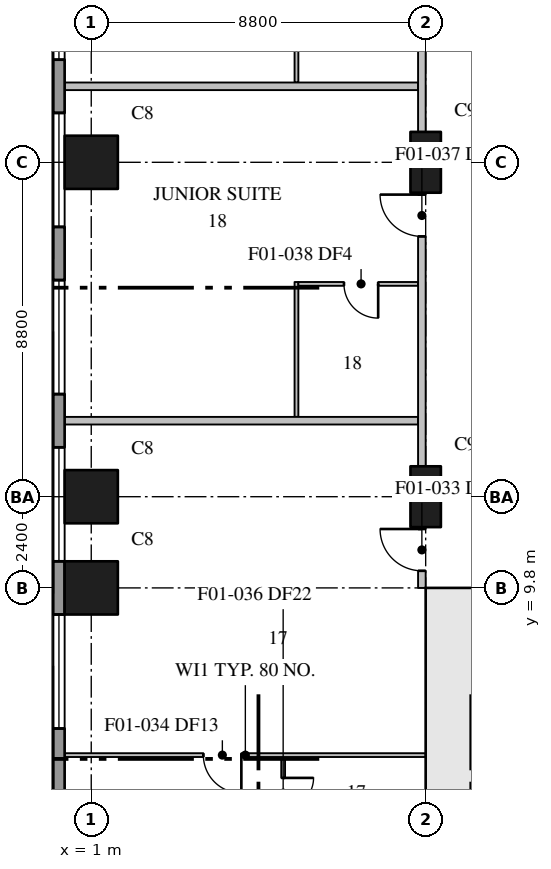
"""IFC4 building model, lengths in metres.
Left out: names, types, materials, properties, quantities, classifications, styles, units other than length and angle.
Written with IfcOpenShell. Run it as: python <this file> out.ifc"""

import sys

from ifc_helpers import new_model, si_unit, direction, frame, frame_2d, origin, origin_2d, place, context, subcontext, project, spatial, rectangle, extrude, element, fill, save


model = new_model("IFC4")
c1 = context("Model", 3, precision=1e-05, world=origin(), true_north=direction((0.0, 1.0)))
c2 = subcontext(c1, "Body", "Model", "MODEL_VIEW")
j1 = project(units=[si_unit("LENGTHUNIT", "METRE"), si_unit("PLANEANGLEUNIT", "RADIAN")], contexts=[c1])
p1 = place(None, origin())
s1 = spatial("IfcSite", under=j1, at=p1, CompositionType="ELEMENT")
p2 = place(p1, origin())
s2 = spatial("IfcBuilding", under=s1, at=p2, CompositionType="ELEMENT")
p3 = place(p2, frame((0.0, 0.0, 37.7)))
s3 = spatial("IfcBuildingStorey", under=s2, at=p3, CompositionType="ELEMENT", Elevation=37.7)
for number, where, z_axis, x_axis in (
    (1, (1.0, 9.8, 0.0), (0.0, 0.0, 1.0), (1.0, 0.0, 0.0)),
    (2, (1.0, 12.2, 0.0), (0.0, 0.0, 1.0), (1.0, 0.0, 0.0)),
    (3, (1.0, 21.0, 0.0), (0.0, 0.0, 1.0), (1.0, 0.0, 0.0)),
):
    element("IfcColumn", number, at=place(p3, frame(where, z_axis=z_axis, x_axis=x_axis)), inside=s3, PredefinedType="COLUMN", context=c2, shape_type="SweptSolid", body=[
        extrude(rectangle(XDim=1.4, YDim=1.4, at=origin_2d()), origin(), (0.0, 0.0, 1.0), 3.7),
    ])
for number, where, z_axis, x_axis in (
    (4, (9.8, 12.2, 0.0), (0.0, 0.0, 1.0), (0.0, 1.0, 0.0)),
    (5, (9.8, 21.0, 0.0), (0.0, 0.0, 1.0), (0.0, 1.0, 0.0)),
):
    element("IfcColumn", number, at=place(p3, frame(where, z_axis=z_axis, x_axis=x_axis)), inside=s3, PredefinedType="COLUMN", context=c2, shape_type="SweptSolid", body=[
        extrude(rectangle(XDim=1.6, YDim=0.8, at=origin_2d()), origin(), (0.0, 0.0, 1.0), 3.7),
    ])
p4 = place(p3, frame((10.5, 1.2, 0.0), z_axis=(0.0, 0.0, 1.0), x_axis=(0.0, 1.0, 0.0)))
e6 = element("IfcWall", 6, at=p4, inside=s3, PredefinedType="SHEAR", context=c2, shape_type="SweptSolid", body=[
    extrude(rectangle(XDim=8.6, YDim=1.0, at=frame_2d((4.3, 0.0))), origin(), (0.0, 0.0, 1.0), 3.7),
])
p5 = place(p3, frame((9.8, 9.6, 0.0), z_axis=(0.0, 0.0, 1.0), x_axis=(1.0, 0.0, 0.0)))
e7 = element("IfcWall", 7, at=p5, inside=s3, PredefinedType="SHEAR", context=c2, shape_type="SweptSolid", body=[
    extrude(rectangle(XDim=4.3, YDim=0.4, at=frame_2d((2.15, 0.0))), origin(), (0.0, 0.0, 1.0), 3.7),
])
p6 = place(p5, frame((2.05, 0.0, 0.0)))
e8 = element("IfcOpeningElement", 8, at=p6, cuts=e7, PredefinedType="OPENING", context=c2, shape_type="SweptSolid", body=[
    extrude(rectangle(XDim=1.2, YDim=2.1, at=frame_2d((0.6, 1.05))), frame((0.0, 0.21, 0.0), z_axis=(0.0, -1.0, 0.0), x_axis=(1.0, 0.0, 0.0)), (0.0, 0.0, 1.0), 0.42),
])
p7 = place(p3, frame((0.15, 78.7, 0.0), z_axis=(0.0, 0.0, 1.0), x_axis=(0.0, -1.0, 0.0)))
e9 = element("IfcWall", 9, at=p7, inside=s3, PredefinedType="STANDARD", context=c2, shape_type="SweptSolid", body=[
    extrude(rectangle(XDim=76.5, YDim=0.3, at=frame_2d((38.25, 0.0))), origin(), (0.0, 0.0, 1.0), 3.4),
])
p8 = place(p7, frame((3.6, 0.0, 0.75)))
e10 = element("IfcOpeningElement", 10, at=p8, cuts=e9, PredefinedType="OPENING", context=c2, shape_type="SweptSolid", body=[
    extrude(rectangle(XDim=3.0, YDim=2.3, at=frame_2d((1.5, 1.15))), frame((0.0, 0.16, 0.0), z_axis=(0.0, -1.0, 0.0), x_axis=(1.0, 0.0, 0.0)), (0.0, 0.0, 1.0), 0.32),
])
p9 = place(p7, frame((8.0, 0.0, 0.75)))
e11 = element("IfcOpeningElement", 11, at=p9, cuts=e9, PredefinedType="OPENING", context=c2, shape_type="SweptSolid", body=[
    extrude(rectangle(XDim=3.0, YDim=2.3, at=frame_2d((1.5, 1.15))), frame((0.0, 0.16, 0.0), z_axis=(0.0, -1.0, 0.0), x_axis=(1.0, 0.0, 0.0)), (0.0, 0.0, 1.0), 0.32),
])
p10 = place(p7, frame((12.4, 0.0, 0.75)))
e12 = element("IfcOpeningElement", 12, at=p10, cuts=e9, PredefinedType="OPENING", context=c2, shape_type="SweptSolid", body=[
    extrude(rectangle(XDim=3.0, YDim=2.3, at=frame_2d((1.5, 1.15))), frame((0.0, 0.16, 0.0), z_axis=(0.0, -1.0, 0.0), x_axis=(1.0, 0.0, 0.0)), (0.0, 0.0, 1.0), 0.32),
])
p11 = place(p7, frame((16.8, 0.0, 0.75)))
e13 = element("IfcOpeningElement", 13, at=p11, cuts=e9, PredefinedType="OPENING", context=c2, shape_type="SweptSolid", body=[
    extrude(rectangle(XDim=3.0, YDim=2.3, at=frame_2d((1.5, 1.15))), frame((0.0, 0.16, 0.0), z_axis=(0.0, -1.0, 0.0), x_axis=(1.0, 0.0, 0.0)), (0.0, 0.0, 1.0), 0.32),
])
p12 = place(p7, frame((21.2, 0.0, 0.75)))
e14 = element("IfcOpeningElement", 14, at=p12, cuts=e9, PredefinedType="OPENING", context=c2, shape_type="SweptSolid", body=[
    extrude(rectangle(XDim=3.0, YDim=2.3, at=frame_2d((1.5, 1.15))), frame((0.0, 0.16, 0.0), z_axis=(0.0, -1.0, 0.0), x_axis=(1.0, 0.0, 0.0)), (0.0, 0.0, 1.0), 0.32),
])
p13 = place(p7, frame((25.6, 0.0, 0.75)))
e15 = element("IfcOpeningElement", 15, at=p13, cuts=e9, PredefinedType="OPENING", context=c2, shape_type="SweptSolid", body=[
    extrude(rectangle(XDim=3.0, YDim=2.3, at=frame_2d((1.5, 1.15))), frame((0.0, 0.16, 0.0), z_axis=(0.0, -1.0, 0.0), x_axis=(1.0, 0.0, 0.0)), (0.0, 0.0, 1.0), 0.32),
])
p14 = place(p7, frame((30.0, 0.0, 0.75)))
e16 = element("IfcOpeningElement", 16, at=p14, cuts=e9, PredefinedType="OPENING", context=c2, shape_type="SweptSolid", body=[
    extrude(rectangle(XDim=3.0, YDim=2.3, at=frame_2d((1.5, 1.15))), frame((0.0, 0.16, 0.0), z_axis=(0.0, -1.0, 0.0), x_axis=(1.0, 0.0, 0.0)), (0.0, 0.0, 1.0), 0.32),
])
p15 = place(p7, frame((34.4, 0.0, 0.75)))
e17 = element("IfcOpeningElement", 17, at=p15, cuts=e9, PredefinedType="OPENING", context=c2, shape_type="SweptSolid", body=[
    extrude(rectangle(XDim=3.0, YDim=2.3, at=frame_2d((1.5, 1.15))), frame((0.0, 0.16, 0.0), z_axis=(0.0, -1.0, 0.0), x_axis=(1.0, 0.0, 0.0)), (0.0, 0.0, 1.0), 0.32),
])
p16 = place(p7, frame((38.8, 0.0, 0.75)))
e18 = element("IfcOpeningElement", 18, at=p16, cuts=e9, PredefinedType="OPENING", context=c2, shape_type="SweptSolid", body=[
    extrude(rectangle(XDim=3.0, YDim=2.3, at=frame_2d((1.5, 1.15))), frame((0.0, 0.16, 0.0), z_axis=(0.0, -1.0, 0.0), x_axis=(1.0, 0.0, 0.0)), (0.0, 0.0, 1.0), 0.32),
])
p17 = place(p7, frame((43.2, 0.0, 0.75)))
e19 = element("IfcOpeningElement", 19, at=p17, cuts=e9, PredefinedType="OPENING", context=c2, shape_type="SweptSolid", body=[
    extrude(rectangle(XDim=3.0, YDim=2.3, at=frame_2d((1.5, 1.15))), frame((0.0, 0.16, 0.0), z_axis=(0.0, -1.0, 0.0), x_axis=(1.0, 0.0, 0.0)), (0.0, 0.0, 1.0), 0.32),
])
p18 = place(p7, frame((47.6, 0.0, 0.75)))
e20 = element("IfcOpeningElement", 20, at=p18, cuts=e9, PredefinedType="OPENING", context=c2, shape_type="SweptSolid", body=[
    extrude(rectangle(XDim=3.0, YDim=2.3, at=frame_2d((1.5, 1.15))), frame((0.0, 0.16, 0.0), z_axis=(0.0, -1.0, 0.0), x_axis=(1.0, 0.0, 0.0)), (0.0, 0.0, 1.0), 0.32),
])
p19 = place(p7, frame((52.0, 0.0, 0.75)))
e21 = element("IfcOpeningElement", 21, at=p19, cuts=e9, PredefinedType="OPENING", context=c2, shape_type="SweptSolid", body=[
    extrude(rectangle(XDim=3.0, YDim=2.3, at=frame_2d((1.5, 1.15))), frame((0.0, 0.16, 0.0), z_axis=(0.0, -1.0, 0.0), x_axis=(1.0, 0.0, 0.0)), (0.0, 0.0, 1.0), 0.32),
])
p20 = place(p7, frame((56.4, 0.0, 0.75)))
e22 = element("IfcOpeningElement", 22, at=p20, cuts=e9, PredefinedType="OPENING", context=c2, shape_type="SweptSolid", body=[
    extrude(rectangle(XDim=3.0, YDim=2.3, at=frame_2d((1.5, 1.15))), frame((0.0, 0.16, 0.0), z_axis=(0.0, -1.0, 0.0), x_axis=(1.0, 0.0, 0.0)), (0.0, 0.0, 1.0), 0.32),
])
p21 = place(p7, frame((60.8, 0.0, 0.75)))
e23 = element("IfcOpeningElement", 23, at=p21, cuts=e9, PredefinedType="OPENING", context=c2, shape_type="SweptSolid", body=[
    extrude(rectangle(XDim=3.0, YDim=2.3, at=frame_2d((1.5, 1.15))), frame((0.0, 0.16, 0.0), z_axis=(0.0, -1.0, 0.0), x_axis=(1.0, 0.0, 0.0)), (0.0, 0.0, 1.0), 0.32),
])
p22 = place(p7, frame((65.2, 0.0, 0.75)))
e24 = element("IfcOpeningElement", 24, at=p22, cuts=e9, PredefinedType="OPENING", context=c2, shape_type="SweptSolid", body=[
    extrude(rectangle(XDim=3.0, YDim=2.3, at=frame_2d((1.5, 1.15))), frame((0.0, 0.16, 0.0), z_axis=(0.0, -1.0, 0.0), x_axis=(1.0, 0.0, 0.0)), (0.0, 0.0, 1.0), 0.32),
])
p23 = place(p7, frame((69.6, 0.0, 0.75)))
e25 = element("IfcOpeningElement", 25, at=p23, cuts=e9, PredefinedType="OPENING", context=c2, shape_type="SweptSolid", body=[
    extrude(rectangle(XDim=3.0, YDim=2.3, at=frame_2d((1.5, 1.15))), frame((0.0, 0.16, 0.0), z_axis=(0.0, -1.0, 0.0), x_axis=(1.0, 0.0, 0.0)), (0.0, 0.0, 1.0), 0.32),
])
p24 = place(p3, frame((9.7, 9.8, 0.0), z_axis=(0.0, 0.0, 1.0), x_axis=(0.0, 1.0, 0.0)))
e26 = element("IfcWall", 26, at=p24, inside=s3, PredefinedType="PARTITIONING", context=c2, shape_type="SweptSolid", body=[
    extrude(rectangle(XDim=1.6, YDim=0.2, at=frame_2d((0.8, 0.0))), origin(), (0.0, 0.0, 1.0), 3.4),
])
p25 = place(p24, frame((0.45, 0.0, 0.0)))
e27 = element("IfcOpeningElement", 27, at=p25, cuts=e26, PredefinedType="OPENING", context=c2, shape_type="SweptSolid", body=[
    extrude(rectangle(XDim=1.1, YDim=2.1, at=frame_2d((0.55, 1.05))), frame((0.0, 0.11, 0.0), z_axis=(0.0, -1.0, 0.0), x_axis=(1.0, 0.0, 0.0)), (0.0, 0.0, 1.0), 0.22),
])
p26 = place(p3, frame((9.7, 13.0, 0.0), z_axis=(0.0, 0.0, 1.0), x_axis=(0.0, 1.0, 0.0)))
e28 = element("IfcWall", 28, at=p26, inside=s3, PredefinedType="PARTITIONING", context=c2, shape_type="SweptSolid", body=[
    extrude(rectangle(XDim=7.2, YDim=0.2, at=frame_2d((3.6, 0.0))), origin(), (0.0, 0.0, 1.0), 3.4),
])
p27 = place(p26, frame((6.05, 0.0, 0.0)))
e29 = element("IfcOpeningElement", 29, at=p27, cuts=e28, PredefinedType="OPENING", context=c2, shape_type="SweptSolid", body=[
    extrude(rectangle(XDim=1.1, YDim=2.1, at=frame_2d((0.55, 1.05))), frame((0.0, 0.11, 0.0), z_axis=(0.0, -1.0, 0.0), x_axis=(1.0, 0.0, 0.0)), (0.0, 0.0, 1.0), 0.22),
])
p28 = place(p3, frame((9.7, 21.8, 0.0), z_axis=(0.0, 0.0, 1.0), x_axis=(0.0, 1.0, 0.0)))
e30 = element("IfcWall", 30, at=p28, inside=s3, PredefinedType="PARTITIONING", context=c2, shape_type="SweptSolid", body=[
    extrude(rectangle(XDim=4.8, YDim=0.2, at=frame_2d((2.4, 0.0))), origin(), (0.0, 0.0, 1.0), 3.4),
])
for number, where, z_axis, x_axis in (
    (31, (0.31, 14.2, 0.0), (0.0, 0.0, 1.0), (1.0, 0.0, 0.0)),
    (32, (0.31, 23.0, 0.0), (0.0, 0.0, 1.0), (1.0, 0.0, 0.0)),
):
    element("IfcWall", number, at=place(p3, frame(where, z_axis=z_axis, x_axis=x_axis)), inside=s3, PredefinedType="PARTITIONING", context=c2, shape_type="SweptSolid", body=[
        extrude(rectangle(XDim=9.29, YDim=0.2, at=frame_2d((4.645, 0.0))), origin(), (0.0, 0.0, 1.0), 3.4),
    ])
p29 = place(p3, frame((6.05, 5.35, 0.0), z_axis=(0.0, 0.0, 1.0), x_axis=(0.0, -1.0, 0.0)))
e33 = element("IfcWall", 33, at=p29, inside=s3, PredefinedType="PARTITIONING", context=c2, shape_type="SweptSolid", body=[
    extrude(rectangle(XDim=4.4, YDim=0.1, at=frame_2d((2.2, 0.0))), origin(), (0.0, 0.0, 1.0), 3.4),
])
p30 = place(p29, frame((2.7, 0.0, 0.0)))
e34 = element("IfcOpeningElement", 34, at=p30, cuts=e33, PredefinedType="OPENING", context=c2, shape_type="SweptSolid", body=[
    extrude(rectangle(XDim=0.9, YDim=2.1, at=frame_2d((0.45, 1.05))), frame((0.0, 0.06, 0.0), z_axis=(0.0, -1.0, 0.0), x_axis=(1.0, 0.0, 0.0)), (0.0, 0.0, 1.0), 0.12),
])
p31 = place(p29, frame((0.55, 0.0, 0.0)))
e35 = element("IfcOpeningElement", 35, at=p31, cuts=e33, PredefinedType="OPENING", context=c2, shape_type="SweptSolid", body=[
    extrude(rectangle(XDim=0.8, YDim=2.1, at=frame_2d((0.4, 1.05))), frame((0.0, 0.06, 0.0), z_axis=(0.0, -1.0, 0.0), x_axis=(1.0, 0.0, 0.0)), (0.0, 0.0, 1.0), 0.12),
])
p32 = place(p3, frame((9.8, 5.4, 0.0), z_axis=(0.0, 0.0, 1.0), x_axis=(-1.0, 0.0, 0.0)))
e36 = element("IfcWall", 36, at=p32, inside=s3, PredefinedType="PARTITIONING", context=c2, shape_type="SweptSolid", body=[
    extrude(rectangle(XDim=9.49, YDim=0.1, at=frame_2d((4.745, 0.0))), origin(), (0.0, 0.0, 1.0), 3.4),
])
p33 = place(p32, frame((4.85, 0.0, 0.0)))
e37 = element("IfcOpeningElement", 37, at=p33, cuts=e36, PredefinedType="OPENING", context=c2, shape_type="SweptSolid", body=[
    extrude(rectangle(XDim=1.0, YDim=2.1, at=frame_2d((0.5, 1.05))), frame((0.0, 0.06, 0.0), z_axis=(0.0, -1.0, 0.0), x_axis=(1.0, 0.0, 0.0)), (0.0, 0.0, 1.0), 0.12),
])
p34 = place(p3, frame((6.4, 14.3, 0.0), z_axis=(0.0, 0.0, 1.0), x_axis=(0.0, 1.0, 0.0)))
e38 = element("IfcWall", 38, at=p34, inside=s3, PredefinedType="PARTITIONING", context=c2, shape_type="SweptSolid", body=[
    extrude(rectangle(XDim=3.55, YDim=0.1, at=frame_2d((1.775, 0.0))), origin(), (0.0, 0.0, 1.0), 3.4),
])
p35 = place(p3, frame((6.4, 23.1, 0.0), z_axis=(0.0, 0.0, 1.0), x_axis=(0.0, 1.0, 0.0)))
e39 = element("IfcWall", 39, at=p35, inside=s3, PredefinedType="PARTITIONING", context=c2, shape_type="SweptSolid", body=[
    extrude(rectangle(XDim=3.55, YDim=0.1, at=frame_2d((1.775, 0.0))), origin(), (0.0, 0.0, 1.0), 3.4),
])
p36 = place(p3, frame((9.6, 17.8, 0.0), z_axis=(0.0, 0.0, 1.0), x_axis=(-1.0, 0.0, 0.0)))
e40 = element("IfcWall", 40, at=p36, inside=s3, PredefinedType="PARTITIONING", context=c2, shape_type="SweptSolid", body=[
    extrude(rectangle(XDim=3.15, YDim=0.1, at=frame_2d((1.575, 0.0))), origin(), (0.0, 0.0, 1.0), 3.4),
])
p37 = place(p36, frame((1.05, 0.0, 0.0)))
e41 = element("IfcOpeningElement", 41, at=p37, cuts=e40, PredefinedType="OPENING", context=c2, shape_type="SweptSolid", body=[
    extrude(rectangle(XDim=0.9, YDim=2.1, at=frame_2d((0.45, 1.05))), frame((0.0, 0.06, 0.0), z_axis=(0.0, -1.0, 0.0), x_axis=(1.0, 0.0, 0.0)), (0.0, 0.0, 1.0), 0.12),
])
p38 = place(p19, origin())
e42 = element("IfcWindow", 42, at=p38, inside=s3, PartitioningType="SINGLE_PANEL", PredefinedType="WINDOW", context=c2, shape_type="SweptSolid", body=[
    extrude(rectangle(XDim=3.0, YDim=2.3, at=frame_2d((1.5, 1.15))), frame((0.0, 0.03, 0.0), z_axis=(0.0, -1.0, 0.0), x_axis=(1.0, 0.0, 0.0)), (0.0, 0.0, 1.0), 0.06),
])
fill(e21, e42)
p39 = place(p20, origin())
e43 = element("IfcWindow", 43, at=p39, inside=s3, PartitioningType="SINGLE_PANEL", PredefinedType="WINDOW", context=c2, shape_type="SweptSolid", body=[
    extrude(rectangle(XDim=3.0, YDim=2.3, at=frame_2d((1.5, 1.15))), frame((0.0, 0.03, 0.0), z_axis=(0.0, -1.0, 0.0), x_axis=(1.0, 0.0, 0.0)), (0.0, 0.0, 1.0), 0.06),
])
fill(e22, e43)
p40 = place(p21, origin())
e44 = element("IfcWindow", 44, at=p40, inside=s3, PartitioningType="SINGLE_PANEL", PredefinedType="WINDOW", context=c2, shape_type="SweptSolid", body=[
    extrude(rectangle(XDim=3.0, YDim=2.3, at=frame_2d((1.5, 1.15))), frame((0.0, 0.03, 0.0), z_axis=(0.0, -1.0, 0.0), x_axis=(1.0, 0.0, 0.0)), (0.0, 0.0, 1.0), 0.06),
])
fill(e23, e44)
p41 = place(p22, origin())
e45 = element("IfcWindow", 45, at=p41, inside=s3, PartitioningType="SINGLE_PANEL", PredefinedType="WINDOW", context=c2, shape_type="SweptSolid", body=[
    extrude(rectangle(XDim=3.0, YDim=2.3, at=frame_2d((1.5, 1.15))), frame((0.0, 0.03, 0.0), z_axis=(0.0, -1.0, 0.0), x_axis=(1.0, 0.0, 0.0)), (0.0, 0.0, 1.0), 0.06),
])
fill(e24, e45)
p42 = place(p23, origin())
e46 = element("IfcWindow", 46, at=p42, inside=s3, PartitioningType="SINGLE_PANEL", PredefinedType="WINDOW", context=c2, shape_type="SweptSolid", body=[
    extrude(rectangle(XDim=3.0, YDim=2.3, at=frame_2d((1.5, 1.15))), frame((0.0, 0.03, 0.0), z_axis=(0.0, -1.0, 0.0), x_axis=(1.0, 0.0, 0.0)), (0.0, 0.0, 1.0), 0.06),
])
fill(e25, e46)
p43 = place(p25, origin())
e47 = element("IfcDoor", 47, at=p43, inside=s3, OperationType="SINGLE_SWING_RIGHT", PredefinedType="DOOR", context=c2, shape_type="SweptSolid", body=[
    extrude(rectangle(XDim=1.1, YDim=2.1, at=frame_2d((0.55, 1.05))), frame((0.0, 0.025, 0.0), z_axis=(0.0, -1.0, 0.0), x_axis=(1.0, 0.0, 0.0)), (0.0, 0.0, 1.0), 0.05),
])
fill(e27, e47)
p44 = place(p33, origin())
e48 = element("IfcDoor", 48, at=p44, inside=s3, OperationType="SINGLE_SWING_LEFT", PredefinedType="DOOR", context=c2, shape_type="SweptSolid", body=[
    extrude(rectangle(XDim=1.0, YDim=2.1, at=frame_2d((0.5, 1.05))), frame((0.0, 0.025, 0.0), z_axis=(0.0, -1.0, 0.0), x_axis=(1.0, 0.0, 0.0)), (0.0, 0.0, 1.0), 0.05),
])
fill(e37, e48)
p45 = place(p31, origin())
e49 = element("IfcDoor", 49, at=p45, inside=s3, OperationType="SINGLE_SWING_LEFT", PredefinedType="DOOR", context=c2, shape_type="SweptSolid", body=[
    extrude(rectangle(XDim=0.8, YDim=2.1, at=frame_2d((0.4, 1.05))), frame((0.0, 0.025, 0.0), z_axis=(0.0, -1.0, 0.0), x_axis=(1.0, 0.0, 0.0)), (0.0, 0.0, 1.0), 0.05),
])
fill(e35, e49)
p46 = place(p27, origin())
e50 = element("IfcDoor", 50, at=p46, inside=s3, OperationType="SINGLE_SWING_RIGHT", PredefinedType="DOOR", context=c2, shape_type="SweptSolid", body=[
    extrude(rectangle(XDim=1.1, YDim=2.1, at=frame_2d((0.55, 1.05))), frame((0.0, 0.025, 0.0), z_axis=(0.0, -1.0, 0.0), x_axis=(1.0, 0.0, 0.0)), (0.0, 0.0, 1.0), 0.05),
])
fill(e29, e50)
p47 = place(p37, origin())
e51 = element("IfcDoor", 51, at=p47, inside=s3, OperationType="SINGLE_SWING_LEFT", PredefinedType="DOOR", context=c2, shape_type="SweptSolid", body=[
    extrude(rectangle(XDim=0.9, YDim=2.1, at=frame_2d((0.45, 1.05))), frame((0.0, 0.025, 0.0), z_axis=(0.0, -1.0, 0.0), x_axis=(1.0, 0.0, 0.0)), (0.0, 0.0, 1.0), 0.05),
])
fill(e41, e51)
save(model, sys.argv[1])
